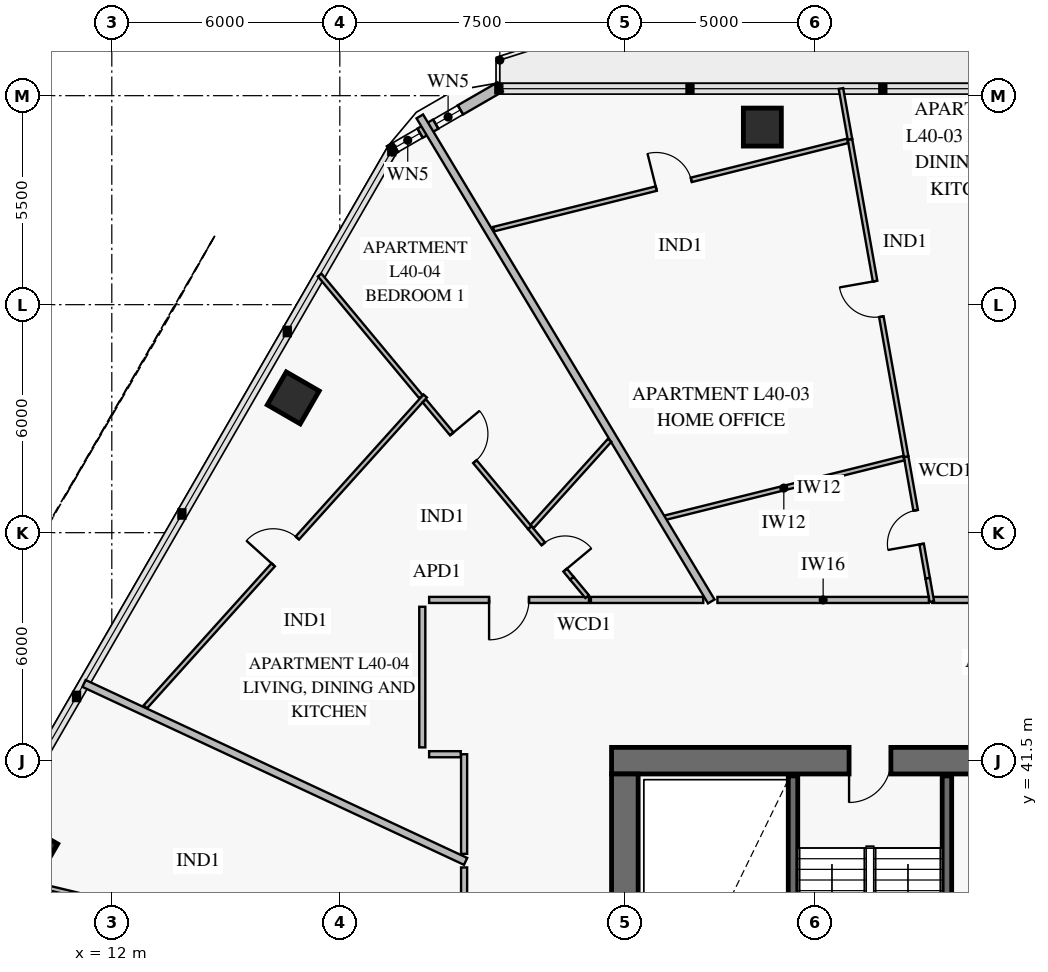
"""IFC4 building model, lengths in metres.
Left out: names, types, materials, properties, quantities, classifications, styles, units other than length and angle.
Written with IfcOpenShell. Run it as: python <this file> out.ifc"""

import sys

from ifc_helpers import new_model, si_unit, direction, frame, frame_2d, origin, origin_2d, place, context, subcontext, project, spatial, rectangle, extrude, element, fill, save


model = new_model("IFC4")
c1 = context("Model", 3, precision=1e-05, world=origin(), true_north=direction((0.0, 1.0)))
c2 = subcontext(c1, "Body", "Model", "MODEL_VIEW")
j1 = project(units=[si_unit("LENGTHUNIT", "METRE"), si_unit("PLANEANGLEUNIT", "RADIAN")], contexts=[c1])
p1 = place(None, origin())
s1 = spatial("IfcSite", under=j1, at=p1, CompositionType="ELEMENT")
p2 = place(p1, origin())
s2 = spatial("IfcBuilding", under=s1, at=p2, CompositionType="ELEMENT")
p3 = place(p2, frame((0.0, 0.0, 161.8)))
s3 = spatial("IfcBuildingStorey", under=s2, at=p3, CompositionType="ELEMENT", Elevation=161.8)
p4 = place(p3, frame((36.75, 41.5, 0.0), z_axis=(0.0, 0.0, 1.0), x_axis=(-1.0, 0.0, 0.0)))
e1 = element("IfcWall", 1, at=p4, inside=s3, PredefinedType="SHEAR", context=c2, shape_type="SweptSolid", body=[
    extrude(rectangle(XDim=11.6, YDim=0.7, at=frame_2d((5.8, 0.0))), origin(), (0.0, 0.0, 1.0), 3.8),
])
p5 = place(p4, frame((4.25, 0.0, 0.0)))
e2 = element("IfcOpeningElement", 2, at=p5, cuts=e1, PredefinedType="OPENING", context=c2, shape_type="SweptSolid", body=[
    extrude(rectangle(XDim=1.1, YDim=2.15, at=frame_2d((0.55, 1.075))), frame((0.0, 0.362, 0.0), z_axis=(0.0, -1.0, 0.0), x_axis=(1.0, 0.0, 0.0)), (0.0, 0.0, 1.0), 0.724),
])
p6 = place(p3, frame((25.5, 22.85, 0.0), z_axis=(0.0, 0.0, 1.0), x_axis=(0.0, 1.0, 0.0)))
e3 = element("IfcWall", 3, at=p6, inside=s3, PredefinedType="SHEAR", context=c2, shape_type="SweptSolid", body=[
    extrude(rectangle(XDim=18.3, YDim=0.7, at=frame_2d((9.15, 0.0))), origin(), (0.0, 0.0, 1.0), 3.8),
])
p7 = place(p6, frame((8.9, 0.0, 0.0)))
e4 = element("IfcOpeningElement", 4, at=p7, cuts=e3, PredefinedType="OPENING", context=c2, shape_type="SweptSolid", body=[
    extrude(rectangle(XDim=1.1, YDim=2.15, at=frame_2d((0.55, 1.075))), frame((0.0, 0.362, 0.0), z_axis=(0.0, -1.0, 0.0), x_axis=(1.0, 0.0, 0.0)), (0.0, 0.0, 1.0), 0.724),
])
for number, where, z_axis, x_axis in (
    (5, (29.118, 58.173, 0.0), (0.0, 0.0, 1.0), (-1.0, 0.0, 0.0)),
    (6, (16.774, 51.047, 0.0), (0.0, 0.0, 1.0), (-0.5, -0.866, 0.0)),
    (7, (9.892, 39.126, 0.0), (0.0, 0.0, 1.0), (-0.5, -0.866, 0.0)),
):
    element("IfcColumn", number, at=place(p3, frame(where, z_axis=z_axis, x_axis=x_axis)), inside=s3, PredefinedType="COLUMN", context=c2, shape_type="SweptSolid", body=[
        extrude(rectangle(XDim=1.0, YDim=1.0, at=origin_2d()), origin(), (0.0, 0.0, 1.0), 3.55),
    ])
p8 = place(p3, frame((19.307, 57.548, 0.0), z_axis=(0.0, 0.0, 1.0), x_axis=(0.866020068361, 0.500009241111, 0.0)))
e8 = element("IfcWall", 8, at=p8, inside=s3, PredefinedType="SOLIDWALL", context=c2, shape_type="SweptSolid", body=[
    extrude(rectangle(XDim=3.365, YDim=0.28, at=frame_2d((1.683, 0.0))), origin(), (0.0, 0.0, 1.0), 3.55),
])
p9 = place(p8, frame((1.406, 0.0, 0.85)))
e9 = element("IfcOpeningElement", 9, at=p9, cuts=e8, PredefinedType="OPENING", context=c2, shape_type="SweptSolid", body=[
    extrude(rectangle(XDim=0.75, YDim=1.5, at=frame_2d((0.375, 0.75))), frame((0.0, 0.152, 0.0), z_axis=(0.0, -1.0, 0.0), x_axis=(1.0, 0.0, 0.0)), (0.0, 0.0, 1.0), 0.304),
])
p10 = place(p8, frame((0.179, 0.0, 0.85)))
e10 = element("IfcOpeningElement", 10, at=p10, cuts=e8, PredefinedType="OPENING", context=c2, shape_type="SweptSolid", body=[
    extrude(rectangle(XDim=0.75, YDim=1.5, at=frame_2d((0.375, 0.75))), frame((0.0, 0.152, 0.0), z_axis=(0.0, -1.0, 0.0), x_axis=(1.0, 0.0, 0.0)), (0.0, 0.0, 1.0), 0.304),
])
for number, where, z_axis, x_axis in (
    (11, (29.925, 31.4, 0.0), (0.0, 0.0, 1.0), (0.0, 1.0, 0.0)),
    (12, (33.975, 31.4, 0.0), (0.0, 0.0, 1.0), (0.0, 1.0, 0.0)),
):
    element("IfcWall", number, at=place(p3, frame(where, z_axis=z_axis, x_axis=x_axis)), inside=s3, PredefinedType="SOLIDWALL", context=c2, shape_type="SweptSolid", body=[
        extrude(rectangle(XDim=9.7, YDim=0.25, at=frame_2d((4.85, 0.0))), origin(), (0.0, 0.0, 1.0), 3.8),
    ])
p11 = place(p3, frame((33.468, 46.3, 0.0), z_axis=(0.0, 0.0, 1.0), x_axis=(-0.174363613102, 0.984681334456, 0.0)))
e13 = element("IfcWall", 13, at=p11, inside=s3, PredefinedType="PARTITIONING", context=c2, shape_type="SweptSolid", body=[
    extrude(rectangle(XDim=3.251, YDim=0.12, at=frame_2d((1.625, 0.0))), origin(), (0.0, 0.0, 1.0), 3.55),
])
p12 = place(p11, frame((0.916, 0.0, 0.0)))
e14 = element("IfcOpeningElement", 14, at=p12, cuts=e13, PredefinedType="OPENING", context=c2, shape_type="SweptSolid", body=[
    extrude(rectangle(XDim=0.9, YDim=2.1, at=frame_2d((0.45, 1.05))), frame((0.0, 0.072, 0.0), z_axis=(0.0, -1.0, 0.0), x_axis=(1.0, 0.0, 0.0)), (0.0, 0.0, 1.0), 0.144),
])
p13 = place(p3, frame((32.902, 49.501, 0.0), z_axis=(0.0, 0.0, 1.0), x_axis=(-0.174358516614, 0.984682236909, 0.0)))
e15 = element("IfcWall", 15, at=p13, inside=s3, PredefinedType="PARTITIONING", context=c2, shape_type="SweptSolid", body=[
    extrude(rectangle(XDim=8.48, YDim=0.12, at=frame_2d((4.24, 0.0))), origin(), (0.0, 0.0, 1.0), 3.15),
])
p14 = place(p13, frame((3.74, 0.0, 0.0)))
e16 = element("IfcOpeningElement", 16, at=p14, cuts=e15, PredefinedType="OPENING", context=c2, shape_type="SweptSolid", body=[
    extrude(rectangle(XDim=0.95, YDim=2.1, at=frame_2d((0.475, 1.05))), frame((0.0, 0.072, 0.0), z_axis=(0.0, -1.0, 0.0), x_axis=(1.0, 0.0, 0.0)), (0.0, 0.0, 1.0), 0.144),
])
p15 = place(p3, frame((31.361, 57.81, 0.0), z_axis=(0.0, 0.0, 1.0), x_axis=(-0.97029492616, -0.241925104669, 0.0)))
e17 = element("IfcWall", 17, at=p15, inside=s3, PredefinedType="PARTITIONING", context=c2, shape_type="SweptSolid", body=[
    extrude(rectangle(XDim=9.598, YDim=0.12, at=frame_2d((4.799, 0.0))), origin(), (0.0, 0.0, 1.0), 2.87),
])
p16 = place(p15, frame((4.24, 0.0, 0.0)))
e18 = element("IfcOpeningElement", 18, at=p16, cuts=e17, PredefinedType="OPENING", context=c2, shape_type="SweptSolid", body=[
    extrude(rectangle(XDim=0.95, YDim=2.1, at=frame_2d((0.475, 1.05))), frame((0.0, 0.072, 0.0), z_axis=(0.0, -1.0, 0.0), x_axis=(1.0, 0.0, 0.0)), (0.0, 0.0, 1.0), 0.144),
])
p17 = place(p3, frame((36.579, 45.73, 0.0), z_axis=(0.0, 0.0, 1.0), x_axis=(-1.0, 0.0, 0.0)))
e19 = element("IfcWall", 19, at=p17, inside=s3, PredefinedType="PARTITIONING", context=c2, shape_type="SweptSolid", body=[
    extrude(rectangle(XDim=2.99, YDim=0.16, at=frame_2d((1.495, 0.0))), origin(), (0.0, 0.0, 1.0), 3.55),
])
p18 = place(p17, frame((0.97, 0.0, 0.0)))
e20 = element("IfcOpeningElement", 20, at=p18, cuts=e19, PredefinedType="OPENING", context=c2, shape_type="SweptSolid", body=[
    extrude(rectangle(XDim=1.05, YDim=2.15, at=frame_2d((0.525, 1.075))), frame((0.0, 0.092, 0.0), z_axis=(0.0, -1.0, 0.0), x_axis=(1.0, 0.0, 0.0)), (0.0, 0.0, 1.0), 0.184),
])
p19 = place(p3, frame((20.248, 51.097, 0.0), z_axis=(0.0, 0.0, 1.0), x_axis=(-0.669133806592, -0.743141943962, 0.0)))
e21 = element("IfcWall", 21, at=p19, inside=s3, PredefinedType="PARTITIONING", context=c2, shape_type="SweptSolid", body=[
    extrude(rectangle(XDim=11.008, YDim=0.12, at=frame_2d((5.504, 0.0))), origin(), (0.0, 0.0, 1.0), 2.9),
])
p20 = place(p19, frame((5.029, 0.0, 0.0)))
e22 = element("IfcOpeningElement", 22, at=p20, cuts=e21, PredefinedType="OPENING", context=c2, shape_type="SweptSolid", body=[
    extrude(rectangle(XDim=0.95, YDim=2.1, at=frame_2d((0.475, 1.05))), frame((0.0, 0.072, 0.0), z_axis=(0.0, -1.0, 0.0), x_axis=(1.0, 0.0, 0.0)), (0.0, 0.0, 1.0), 0.144),
])
p21 = place(p3, frame((24.107, 46.3, 0.0), z_axis=(0.0, 0.0, 1.0), x_axis=(-0.639380963996, 0.76889009805, 0.0)))
e23 = element("IfcWall", 23, at=p21, inside=s3, PredefinedType="PARTITIONING", context=c2, shape_type="SweptSolid", body=[
    extrude(rectangle(XDim=1.734, YDim=0.12, at=frame_2d((0.867, 0.0))), origin(), (0.0, 0.0, 1.0), 3.55),
])
p22 = place(p21, frame((0.278, 0.0, 0.0)))
e24 = element("IfcOpeningElement", 24, at=p22, cuts=e23, PredefinedType="OPENING", context=c2, shape_type="SweptSolid", body=[
    extrude(rectangle(XDim=0.9, YDim=2.1, at=frame_2d((0.45, 1.05))), frame((0.0, 0.072, 0.0), z_axis=(0.0, -1.0, 0.0), x_axis=(1.0, 0.0, 0.0)), (0.0, 0.0, 1.0), 0.144),
])
p23 = place(p3, frame((22.998, 47.634, 0.0), z_axis=(0.0, 0.0, 1.0), x_axis=(-0.639447858882, 0.76883446578, 0.0)))
e25 = element("IfcWall", 25, at=p23, inside=s3, PredefinedType="PARTITIONING", context=c2, shape_type="SweptSolid", body=[
    extrude(rectangle(XDim=4.338, YDim=0.12, at=frame_2d((2.169, 0.0))), origin(), (0.0, 0.0, 1.0), 3.55),
])
p24 = place(p23, frame((2.257, 0.0, 0.0)))
e26 = element("IfcOpeningElement", 26, at=p24, cuts=e25, PredefinedType="OPENING", context=c2, shape_type="SweptSolid", body=[
    extrude(rectangle(XDim=0.95, YDim=2.1, at=frame_2d((0.475, 1.05))), frame((0.0, 0.072, 0.0), z_axis=(0.0, -1.0, 0.0), x_axis=(1.0, 0.0, 0.0)), (0.0, 0.0, 1.0), 0.144),
])
p25 = place(p3, frame((20.136, 51.074, 0.0), z_axis=(0.0, 0.0, 1.0), x_axis=(-0.639446992495, 0.768835186362, 0.0)))
e27 = element("IfcWall", 27, at=p25, inside=s3, PredefinedType="PARTITIONING", context=c2, shape_type="SweptSolid", body=[
    extrude(rectangle(XDim=4.17, YDim=0.12, at=frame_2d((2.085, 0.0))), origin(), (0.0, 0.0, 1.0), 2.87),
])
p26 = place(p3, frame((24.555, 45.73, 0.0), z_axis=(0.0, 0.0, 1.0), x_axis=(-1.0, 0.0, 0.0)))
e28 = element("IfcWall", 28, at=p26, inside=s3, PredefinedType="PARTITIONING", context=c2, shape_type="SweptSolid", body=[
    extrude(rectangle(XDim=4.205, YDim=0.16, at=frame_2d((2.103, 0.0))), origin(), (0.0, 0.0, 1.0), 2.9),
])
p27 = place(p26, frame((1.577, 0.0, 0.0)))
e29 = element("IfcOpeningElement", 29, at=p27, cuts=e28, PredefinedType="OPENING", context=c2, shape_type="SweptSolid", body=[
    extrude(rectangle(XDim=1.05, YDim=2.15, at=frame_2d((0.525, 1.075))), frame((0.0, 0.092, 0.0), z_axis=(0.0, -1.0, 0.0), x_axis=(1.0, 0.0, 0.0)), (0.0, 0.0, 1.0), 0.184),
])
p28 = place(p3, frame((18.276, 36.249, 0.0), z_axis=(0.0, 0.0, 1.0), x_axis=(-0.972453575949, 0.233096637953, 0.0)))
e30 = element("IfcWall", 30, at=p28, inside=s3, PredefinedType="PARTITIONING", context=c2, shape_type="SweptSolid", body=[
    extrude(rectangle(XDim=8.622, YDim=0.12, at=frame_2d((4.311, 0.0))), origin(), (0.0, 0.0, 1.0), 2.87),
])
p29 = place(p28, frame((3.811, 0.0, 0.0)))
e31 = element("IfcOpeningElement", 31, at=p29, cuts=e30, PredefinedType="OPENING", context=c2, shape_type="SweptSolid", body=[
    extrude(rectangle(XDim=0.95, YDim=2.1, at=frame_2d((0.475, 1.05))), frame((0.0, 0.072, 0.0), z_axis=(0.0, -1.0, 0.0), x_axis=(1.0, 0.0, 0.0)), (0.0, 0.0, 1.0), 0.144),
])
p30 = place(p3, frame((21.27, 38.691, 0.0), z_axis=(0.0, 0.0, 1.0), x_axis=(0.0, -1.0, 0.0)))
e32 = element("IfcWall", 32, at=p30, inside=s3, PredefinedType="PARTITIONING", context=c2, shape_type="SweptSolid", body=[
    extrude(rectangle(XDim=3.139, YDim=0.16, at=frame_2d((1.57, 0.0))), origin(), (0.0, 0.0, 1.0), 2.9),
])
p31 = place(p30, frame((1.045, 0.0, 0.0)))
e33 = element("IfcOpeningElement", 33, at=p31, cuts=e32, PredefinedType="OPENING", context=c2, shape_type="SweptSolid", body=[
    extrude(rectangle(XDim=1.05, YDim=2.15, at=frame_2d((0.525, 1.075))), frame((0.0, 0.092, 0.0), z_axis=(0.0, -1.0, 0.0), x_axis=(1.0, 0.0, 0.0)), (0.0, 0.0, 1.0), 0.184),
])
p32 = place(p3, frame((33.577, 45.685, 0.0), z_axis=(0.0, 0.0, 1.0), x_axis=(-0.174030737969, 0.984740220689, 0.0)))
e34 = element("IfcWall", 34, at=p32, inside=s3, PredefinedType="PARTITIONING", context=c2, shape_type="SweptSolid", body=[
    extrude(rectangle(XDim=0.624, YDim=0.12, at=frame_2d((0.312, 0.0))), origin(), (0.0, 0.0, 1.0), 3.55),
])
p33 = place(p3, frame((31.423, 57.851, 0.0), z_axis=(0.0, 0.0, 1.0), x_axis=(-0.174452178644, 0.9846656475, 0.0)))
e35 = element("IfcWall", 35, at=p33, inside=s3, PredefinedType="PARTITIONING", context=c2, shape_type="SweptSolid", body=[
    extrude(rectangle(XDim=1.357, YDim=0.12, at=frame_2d((0.679, 0.0))), origin(), (0.0, 0.0, 1.0), 2.87),
])
p34 = place(p3, frame((32.84, 49.46, 0.0), z_axis=(0.0, 0.0, 1.0), x_axis=(-0.970292398296, -0.241935243009, 0.0)))
e36 = element("IfcWall", 36, at=p34, inside=s3, PredefinedType="PARTITIONING", context=c2, shape_type="SweptSolid", body=[
    extrude(rectangle(XDim=6.507, YDim=0.12, at=frame_2d((3.253, 0.0))), origin(), (0.0, 0.0, 1.0), 2.9),
])
p35 = place(p3, frame((27.774, 45.69, 0.0), z_axis=(0.0, 0.0, 1.0), x_axis=(-0.515035727322, 0.857168711271, 0.0)))
e37 = element("IfcWall", 37, at=p35, inside=s3, PredefinedType="PARTITIONING", context=c2, shape_type="SweptSolid", body=[
    extrude(rectangle(XDim=14.891, YDim=0.2, at=frame_2d((7.446, 0.0))), origin(), (0.0, 0.0, 1.0), 2.87),
])
p36 = place(p3, frame((24.508, 45.818, 0.0), z_axis=(0.0, 0.0, 1.0), x_axis=(-0.639724708175, 0.768604122908, 0.0)))
e38 = element("IfcWall", 38, at=p36, inside=s3, PredefinedType="PARTITIONING", context=c2, shape_type="SweptSolid", body=[
    extrude(rectangle(XDim=0.627, YDim=0.12, at=frame_2d((0.313, 0.0))), origin(), (0.0, 0.0, 1.0), 3.55),
])
p37 = place(p3, frame((25.1, 49.931, 0.0), z_axis=(0.0, 0.0, 1.0), x_axis=(-0.669185903369, -0.7430950321, 0.0)))
e39 = element("IfcWall", 39, at=p37, inside=s3, PredefinedType="PARTITIONING", context=c2, shape_type="SweptSolid", body=[
    extrude(rectangle(XDim=3.049, YDim=0.12, at=frame_2d((1.524, 0.0))), origin(), (0.0, 0.0, 1.0), 3.55),
])
p38 = place(p3, frame((21.31, 38.85, 0.0), z_axis=(0.0, 0.0, 1.0), x_axis=(-0.906310899559, 0.422611586851, 0.0)))
e40 = element("IfcWall", 40, at=p38, inside=s3, PredefinedType="PARTITIONING", context=c2, shape_type="SweptSolid", body=[
    extrude(rectangle(XDim=11.078, YDim=0.2, at=frame_2d((5.539, 0.0))), origin(), (0.0, 0.0, 1.0), 2.87),
])
p39 = place(p3, frame((33.5, 45.73, 0.0), z_axis=(0.0, 0.0, 1.0), x_axis=(-1.0, 0.0, 0.0)))
e41 = element("IfcWall", 41, at=p39, inside=s3, PredefinedType="PARTITIONING", context=c2, shape_type="SweptSolid", body=[
    extrude(rectangle(XDim=5.564, YDim=0.16, at=frame_2d((2.782, 0.0))), origin(), (0.0, 0.0, 1.0), 2.9),
])
p40 = place(p3, frame((20.17, 45.55, 0.0), z_axis=(0.0, 0.0, 1.0), x_axis=(0.0, -1.0, 0.0)))
e42 = element("IfcWall", 42, at=p40, inside=s3, PredefinedType="PARTITIONING", context=c2, shape_type="SweptSolid", body=[
    extrude(rectangle(XDim=3.7, YDim=0.16, at=frame_2d((1.85, 0.0))), origin(), (0.0, 0.0, 1.0), 3.15),
])
p41 = place(p3, frame((21.27, 41.67, 0.0), z_axis=(0.0, 0.0, 1.0), x_axis=(0.0, -1.0, 0.0)))
e43 = element("IfcWall", 43, at=p41, inside=s3, PredefinedType="PARTITIONING", context=c2, shape_type="SweptSolid", body=[
    extrude(rectangle(XDim=2.622, YDim=0.16, at=frame_2d((1.311, 0.0))), origin(), (0.0, 0.0, 1.0), 3.55),
])
p42 = place(p3, frame((20.35, 41.67, 0.0), z_axis=(0.0, 0.0, 1.0), x_axis=(1.0, 0.0, 0.0)))
e44 = element("IfcWall", 44, at=p42, inside=s3, PredefinedType="PARTITIONING", context=c2, shape_type="SweptSolid", body=[
    extrude(rectangle(XDim=0.832, YDim=0.16, at=frame_2d((0.416, 0.0))), origin(), (0.0, 0.0, 1.0), 3.55),
])
p43 = place(p3, frame((27.563, 45.73, 0.0), z_axis=(0.0, 0.0, 1.0), x_axis=(-1.0, 0.0, 0.0)))
e45 = element("IfcWall", 45, at=p43, inside=s3, PredefinedType="PARTITIONING", context=c2, shape_type="SweptSolid", body=[
    extrude(rectangle(XDim=2.956, YDim=0.16, at=frame_2d((1.478, 0.0))), origin(), (0.0, 0.0, 1.0), 3.55),
])
p44 = place(p9, origin())
e46 = element("IfcWindow", 46, at=p44, inside=s3, PartitioningType="SINGLE_PANEL", PredefinedType="WINDOW", context=c2, shape_type="SweptSolid", body=[
    extrude(rectangle(XDim=0.75, YDim=1.5, at=frame_2d((0.375, 0.75))), frame((0.0, 0.03, 0.0), z_axis=(0.0, -1.0, 0.0), x_axis=(1.0, 0.0, 0.0)), (0.0, 0.0, 1.0), 0.06),
])
fill(e9, e46)
p45 = place(p10, origin())
e47 = element("IfcWindow", 47, at=p45, inside=s3, PartitioningType="SINGLE_PANEL", PredefinedType="WINDOW", context=c2, shape_type="SweptSolid", body=[
    extrude(rectangle(XDim=0.75, YDim=1.5, at=frame_2d((0.375, 0.75))), frame((0.0, 0.03, 0.0), z_axis=(0.0, -1.0, 0.0), x_axis=(1.0, 0.0, 0.0)), (0.0, 0.0, 1.0), 0.06),
])
fill(e10, e47)
p46 = place(p5, origin())
e48 = element("IfcDoor", 48, at=p46, inside=s3, OperationType="SINGLE_SWING_RIGHT", PredefinedType="USERDEFINED", context=c2, shape_type="SweptSolid", body=[
    extrude(rectangle(XDim=1.1, YDim=2.15, at=frame_2d((0.55, 1.075))), frame((0.0, 0.025, 0.0), z_axis=(0.0, -1.0, 0.0), x_axis=(1.0, 0.0, 0.0)), (0.0, 0.0, 1.0), 0.05),
])
fill(e2, e48)
p47 = place(p12, origin())
e49 = element("IfcDoor", 49, at=p47, inside=s3, OperationType="SINGLE_SWING_LEFT", PredefinedType="DOOR", context=c2, shape_type="SweptSolid", body=[
    extrude(rectangle(XDim=0.9, YDim=2.1, at=frame_2d((0.45, 1.05))), frame((0.0, 0.025, 0.0), z_axis=(0.0, -1.0, 0.0), x_axis=(1.0, 0.0, 0.0)), (0.0, 0.0, 1.0), 0.05),
])
fill(e14, e49)
p48 = place(p14, origin())
e50 = element("IfcDoor", 50, at=p48, inside=s3, OperationType="SINGLE_SWING_RIGHT", PredefinedType="DOOR", context=c2, shape_type="SweptSolid", body=[
    extrude(rectangle(XDim=0.95, YDim=2.1, at=frame_2d((0.475, 1.05))), frame((0.0, 0.025, 0.0), z_axis=(0.0, -1.0, 0.0), x_axis=(1.0, 0.0, 0.0)), (0.0, 0.0, 1.0), 0.05),
])
fill(e16, e50)
p49 = place(p16, frame((0.95, 0.0, 0.0), z_axis=(0.0, 0.0, 1.0), x_axis=(-1.0, 0.0, 0.0)))
e51 = element("IfcDoor", 51, at=p49, inside=s3, OperationType="SINGLE_SWING_LEFT", PredefinedType="DOOR", context=c2, shape_type="SweptSolid", body=[
    extrude(rectangle(XDim=0.95, YDim=2.1, at=frame_2d((0.475, 1.05))), frame((0.0, 0.025, 0.0), z_axis=(0.0, -1.0, 0.0), x_axis=(1.0, 0.0, 0.0)), (0.0, 0.0, 1.0), 0.05),
])
fill(e18, e51)
p50 = place(p20, frame((0.95, 0.0, 0.0), z_axis=(0.0, 0.0, 1.0), x_axis=(-1.0, 0.0, 0.0)))
e52 = element("IfcDoor", 52, at=p50, inside=s3, OperationType="SINGLE_SWING_LEFT", PredefinedType="DOOR", context=c2, shape_type="SweptSolid", body=[
    extrude(rectangle(XDim=0.95, YDim=2.1, at=frame_2d((0.475, 1.05))), frame((0.0, 0.025, 0.0), z_axis=(0.0, -1.0, 0.0), x_axis=(1.0, 0.0, 0.0)), (0.0, 0.0, 1.0), 0.05),
])
fill(e22, e52)
p51 = place(p22, frame((0.9, 0.0, 0.0), z_axis=(0.0, 0.0, 1.0), x_axis=(-1.0, 0.0, 0.0)))
e53 = element("IfcDoor", 53, at=p51, inside=s3, OperationType="SINGLE_SWING_RIGHT", PredefinedType="DOOR", context=c2, shape_type="SweptSolid", body=[
    extrude(rectangle(XDim=0.9, YDim=2.1, at=frame_2d((0.45, 1.05))), frame((0.0, 0.025, 0.0), z_axis=(0.0, -1.0, 0.0), x_axis=(1.0, 0.0, 0.0)), (0.0, 0.0, 1.0), 0.05),
])
fill(e24, e53)
p52 = place(p24, frame((0.95, 0.0, 0.0), z_axis=(0.0, 0.0, 1.0), x_axis=(-1.0, 0.0, 0.0)))
e54 = element("IfcDoor", 54, at=p52, inside=s3, OperationType="SINGLE_SWING_LEFT", PredefinedType="DOOR", context=c2, shape_type="SweptSolid", body=[
    extrude(rectangle(XDim=0.95, YDim=2.1, at=frame_2d((0.475, 1.05))), frame((0.0, 0.025, 0.0), z_axis=(0.0, -1.0, 0.0), x_axis=(1.0, 0.0, 0.0)), (0.0, 0.0, 1.0), 0.05),
])
fill(e26, e54)
p53 = place(p27, origin())
e55 = element("IfcDoor", 55, at=p53, inside=s3, OperationType="SINGLE_SWING_RIGHT", PredefinedType="DOOR", context=c2, shape_type="SweptSolid", body=[
    extrude(rectangle(XDim=1.05, YDim=2.15, at=frame_2d((0.525, 1.075))), frame((0.0, 0.025, 0.0), z_axis=(0.0, -1.0, 0.0), x_axis=(1.0, 0.0, 0.0)), (0.0, 0.0, 1.0), 0.05),
])
fill(e29, e55)
save(model, sys.argv[1])
